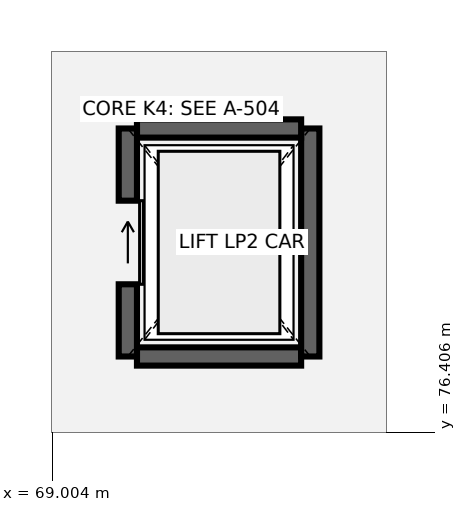
"""IFC4 building model, lengths in metres.
Left out: names, types, materials, properties, quantities, classifications, styles, units other than length and angle.
Written with IfcOpenShell. Run it as: python <this file> out.ifc"""

import sys

from ifc_helpers import new_model, si_unit, direction, frame, frame_2d, origin, place, context, subcontext, project, spatial, rectangle, extrude, element, fill, save


model = new_model("IFC4")
c1 = context("Model", 3, precision=1e-05, world=origin(), true_north=direction((0.0, 1.0)))
c2 = subcontext(c1, "Body", "Model", "MODEL_VIEW")
j1 = project(units=[si_unit("LENGTHUNIT", "METRE"), si_unit("PLANEANGLEUNIT", "RADIAN")], contexts=[c1])
p1 = place(None, origin())
s1 = spatial("IfcSite", under=j1, at=p1, CompositionType="ELEMENT")
p2 = place(p1, origin())
s2 = spatial("IfcBuilding", under=s1, at=p2, CompositionType="ELEMENT")
p3 = place(p2, frame((0.0, 0.0, 5.4)))
s3 = spatial("IfcBuildingStorey", under=s2, at=p3, CompositionType="ELEMENT", Elevation=5.4)
p4 = place(p3, frame((70.12, 77.4, 0.0), z_axis=(0.0, 0.0, 1.0), x_axis=(1.0, 0.0, 0.0)))
e1 = element("IfcWall", 1, at=p4, inside=s3, PredefinedType="SHEAR", context=c2, shape_type="SweptSolid", body=[
    extrude(rectangle(XDim=2.16, YDim=0.24, at=frame_2d((1.08, 0.0))), origin(), (0.0, 0.0, 1.0), 4.5),
])
p5 = place(p3, frame((72.4, 77.4, 0.0), z_axis=(0.0, 0.0, 1.0), x_axis=(0.0, 1.0, 0.0)))
e2 = element("IfcWall", 2, at=p5, inside=s3, PredefinedType="SHEAR", context=c2, shape_type="SweptSolid", body=[
    extrude(rectangle(XDim=3.0, YDim=0.24, at=frame_2d((1.5, 0.0))), origin(), (0.0, 0.0, 1.0), 4.5),
])
p6 = place(p3, frame((72.28, 80.4, 0.0), z_axis=(0.0, 0.0, 1.0), x_axis=(-1.0, 0.0, 0.0)))
e3 = element("IfcWall", 3, at=p6, inside=s3, PredefinedType="SHEAR", context=c2, shape_type="SweptSolid", body=[
    extrude(rectangle(XDim=2.16, YDim=0.24, at=frame_2d((1.08, 0.0))), origin(), (0.0, 0.0, 1.0), 4.5),
])
p7 = place(p3, frame((70.0, 80.4, 0.0), z_axis=(0.0, 0.0, 1.0), x_axis=(0.0, -1.0, 0.0)))
e4 = element("IfcWall", 4, at=p7, inside=s3, PredefinedType="SHEAR", context=c2, shape_type="SweptSolid", body=[
    extrude(rectangle(XDim=3.0, YDim=0.24, at=frame_2d((1.5, 0.0))), origin(), (0.0, 0.0, 1.0), 4.5),
])
p8 = place(p7, frame((0.95, 0.0, 0.0)))
e5 = element("IfcOpeningElement", 5, at=p8, cuts=e4, PredefinedType="OPENING", context=c2, shape_type="SweptSolid", body=[
    extrude(rectangle(XDim=1.1, YDim=2.1, at=frame_2d((0.55, 1.05))), frame((0.0, 0.13, 0.0), z_axis=(0.0, -1.0, 0.0), x_axis=(1.0, 0.0, 0.0)), (0.0, 0.0, 1.0), 0.26),
])
p9 = place(p8, origin())
e6 = element("IfcDoor", 6, at=p9, inside=s3, OperationType="SLIDING_TO_LEFT", PredefinedType="DOOR", context=c2, shape_type="SweptSolid", body=[
    extrude(rectangle(XDim=1.1, YDim=2.1, at=frame_2d((0.55, 1.05))), frame((0.0, 0.025, 0.0), z_axis=(0.0, -1.0, 0.0), x_axis=(1.0, 0.0, 0.0)), (0.0, 0.0, 1.0), 0.05),
])
fill(e5, e6)
save(model, sys.argv[1])
